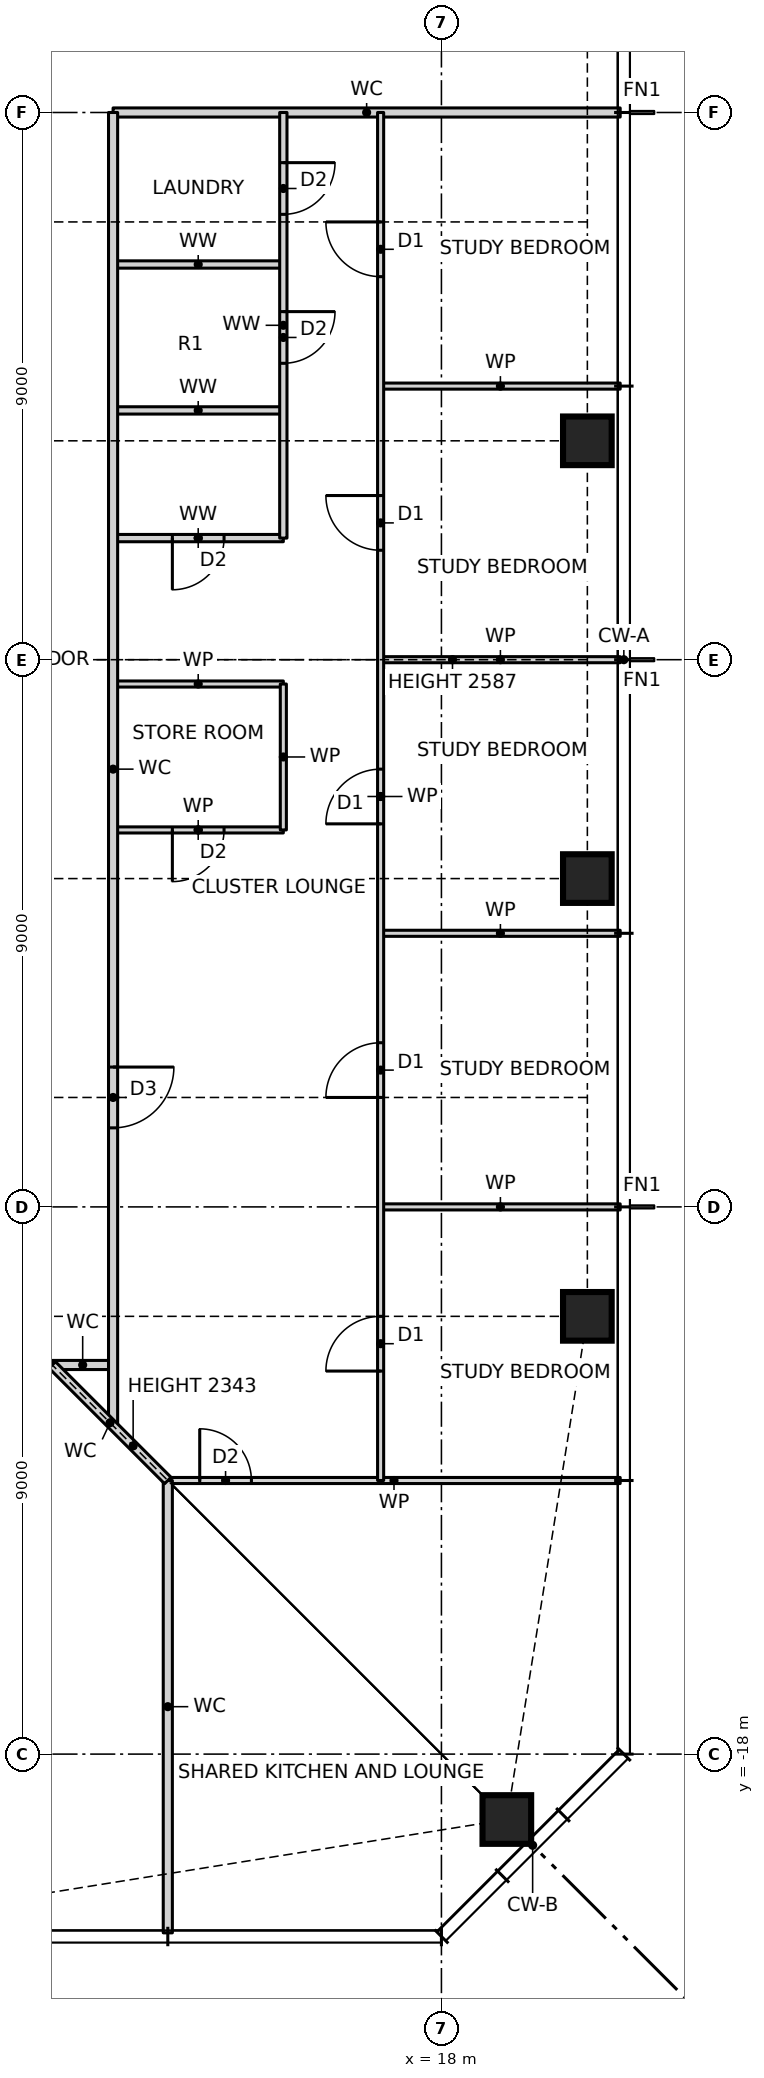
"""IFC4 building model, lengths in metres.
Left out: names, types, materials, properties, quantities, classifications, styles, units other than length and angle.
Written with IfcOpenShell. Run it as: python <this file> out.ifc"""

import sys

from ifc_helpers import new_model, si_unit, direction, frame, frame_2d, origin, origin_2d, place, context, subcontext, project, spatial, rectangle, hollow_rectangle, extrude, element, fill, save


model = new_model("IFC4")
c1 = context("Model", 3, precision=1e-05, world=origin(), true_north=direction((0.0, 1.0)))
c2 = subcontext(c1, "Body", "Model", "MODEL_VIEW")
j1 = project(units=[si_unit("LENGTHUNIT", "METRE"), si_unit("PLANEANGLEUNIT", "RADIAN")], contexts=[c1])
p1 = place(None, origin())
s1 = spatial("IfcSite", under=j1, at=p1, CompositionType="ELEMENT")
p2 = place(p1, origin())
s2 = spatial("IfcBuilding", under=s1, at=p2, CompositionType="ELEMENT")
p3 = place(p2, frame((0.0, 0.0, 101.5)))
s3 = spatial("IfcBuildingStorey", under=s2, at=p3, CompositionType="ELEMENT", Elevation=101.5)
for number, where, z_axis, x_axis in (
    (1, (19.076, -19.076, 0.0), (0.0, 0.0, 1.0), (1.0, 0.0, 0.0)),
    (2, (20.4, -10.8, 0.0), (0.0, 0.0, 1.0), (1.0, 0.0, 0.0)),
    (3, (20.4, -3.6, 0.0), (0.0, 0.0, 1.0), (1.0, 0.0, 0.0)),
    (4, (20.4, 3.6, 0.0), (0.0, 0.0, 1.0), (1.0, 0.0, 0.0)),
):
    element("IfcColumn", number, at=place(p3, frame(where, z_axis=z_axis, x_axis=x_axis)), inside=s3, PredefinedType="COLUMN", context=c2, shape_type="SweptSolid", body=[
        extrude(hollow_rectangle(XDim=0.8, YDim=0.8, WallThickness=0.07, at=origin_2d()), origin(), (0.0, 0.0, 1.0), 3.5),
    ])
p4 = place(p3, frame((13.5, -13.5, 0.0), z_axis=(0.0, 0.0, 1.0), x_axis=(1.0, 0.0, 0.0)))
e5 = element("IfcWall", 5, at=p4, inside=s3, PredefinedType="PARTITIONING", context=c2, shape_type="SweptSolid", body=[
    extrude(rectangle(XDim=7.44, YDim=0.1, at=frame_2d((3.72, 0.0))), origin(), (0.0, 0.0, 1.0), 3.27),
])
p5 = place(p4, frame((0.525, 0.0, 0.0)))
e6 = element("IfcOpeningElement", 6, at=p5, cuts=e5, PredefinedType="OPENING", context=c2, shape_type="SweptSolid", body=[
    extrude(rectangle(XDim=0.85, YDim=2.1, at=frame_2d((0.425, 1.05))), frame((0.0, 0.06, 0.0), z_axis=(0.0, -1.0, 0.0), x_axis=(1.0, 0.0, 0.0)), (0.0, 0.0, 1.0), 0.12),
])
p6 = place(p3, frame((11.6, -11.6, 0.0), z_axis=(0.0, 0.0, 1.0), x_axis=(1.0, 0.0, 0.0)))
e7 = element("IfcWall", 7, at=p6, inside=s3, PredefinedType="PARTITIONING", context=c2, shape_type="SweptSolid", body=[
    extrude(rectangle(XDim=1.0, YDim=0.15, at=frame_2d((0.5, 0.0))), origin(), (0.0, 0.0, 1.0), 3.27),
])
for number, where, z_axis, x_axis in (
    (8, (17.0, -9.0, 0.0), (0.0, 0.0, 1.0), (1.0, 0.0, 0.0)),
    (9, (17.0, -4.5, 0.0), (0.0, 0.0, 1.0), (1.0, 0.0, 0.0)),
):
    element("IfcWall", number, at=place(p3, frame(where, z_axis=z_axis, x_axis=x_axis)), inside=s3, PredefinedType="PARTITIONING", context=c2, shape_type="SweptSolid", body=[
        extrude(rectangle(XDim=3.94, YDim=0.1, at=frame_2d((1.97, 0.0))), origin(), (0.0, 0.0, 1.0), 3.27),
    ])
p7 = place(p3, frame((12.6, -2.8, 0.0), z_axis=(0.0, 0.0, 1.0), x_axis=(1.0, 0.0, 0.0)))
e10 = element("IfcWall", 10, at=p7, inside=s3, PredefinedType="PARTITIONING", context=c2, shape_type="SweptSolid", body=[
    extrude(rectangle(XDim=2.8, YDim=0.1, at=frame_2d((1.4, 0.0))), origin(), (0.0, 0.0, 1.0), 3.27),
])
p8 = place(p7, frame((0.975, 0.0, 0.0)))
e11 = element("IfcOpeningElement", 11, at=p8, cuts=e10, PredefinedType="OPENING", context=c2, shape_type="SweptSolid", body=[
    extrude(rectangle(XDim=0.85, YDim=2.1, at=frame_2d((0.425, 1.05))), frame((0.0, 0.06, 0.0), z_axis=(0.0, -1.0, 0.0), x_axis=(1.0, 0.0, 0.0)), (0.0, 0.0, 1.0), 0.12),
])
p9 = place(p3, frame((12.6, -0.4, 0.0), z_axis=(0.0, 0.0, 1.0), x_axis=(1.0, 0.0, 0.0)))
e12 = element("IfcWall", 12, at=p9, inside=s3, PredefinedType="PARTITIONING", context=c2, shape_type="SweptSolid", body=[
    extrude(rectangle(XDim=2.8, YDim=0.1, at=frame_2d((1.4, 0.0))), origin(), (0.0, 0.0, 1.0), 3.27),
])
p10 = place(p3, frame((17.0, 0.0, 0.0), z_axis=(0.0, 0.0, 1.0), x_axis=(1.0, 0.0, 0.0)))
e13 = element("IfcWall", 13, at=p10, inside=s3, PredefinedType="PARTITIONING", context=c2, shape_type="SweptSolid", body=[
    extrude(rectangle(XDim=3.94, YDim=0.1, at=frame_2d((1.97, 0.0))), origin(), (0.0, 0.0, 1.0), 2.587),
])
p11 = place(p3, frame((12.6, 2.0, 0.0), z_axis=(0.0, 0.0, 1.0), x_axis=(1.0, 0.0, 0.0)))
e14 = element("IfcWall", 14, at=p11, inside=s3, PredefinedType="PARTITIONING", context=c2, shape_type="SweptSolid", body=[
    extrude(rectangle(XDim=2.8, YDim=0.12, at=frame_2d((1.4, 0.0))), origin(), (0.0, 0.0, 1.0), 3.27),
])
p12 = place(p11, frame((0.975, 0.0, 0.0)))
e15 = element("IfcOpeningElement", 15, at=p12, cuts=e14, PredefinedType="OPENING", context=c2, shape_type="SweptSolid", body=[
    extrude(rectangle(XDim=0.85, YDim=2.1, at=frame_2d((0.425, 1.05))), frame((0.0, 0.07, 0.0), z_axis=(0.0, -1.0, 0.0), x_axis=(1.0, 0.0, 0.0)), (0.0, 0.0, 1.0), 0.14),
])
p13 = place(p3, frame((12.6, 4.1, 0.0), z_axis=(0.0, 0.0, 1.0), x_axis=(1.0, 0.0, 0.0)))
e16 = element("IfcWall", 16, at=p13, inside=s3, PredefinedType="PARTITIONING", context=c2, shape_type="SweptSolid", body=[
    extrude(rectangle(XDim=2.8, YDim=0.12, at=frame_2d((1.4, 0.0))), origin(), (0.0, 0.0, 1.0), 3.27),
])
p14 = place(p3, frame((17.0, 4.5, 0.0), z_axis=(0.0, 0.0, 1.0), x_axis=(1.0, 0.0, 0.0)))
e17 = element("IfcWall", 17, at=p14, inside=s3, PredefinedType="PARTITIONING", context=c2, shape_type="SweptSolid", body=[
    extrude(rectangle(XDim=3.94, YDim=0.1, at=frame_2d((1.97, 0.0))), origin(), (0.0, 0.0, 1.0), 3.27),
])
p15 = place(p3, frame((12.6, 6.5, 0.0), z_axis=(0.0, 0.0, 1.0), x_axis=(1.0, 0.0, 0.0)))
e18 = element("IfcWall", 18, at=p15, inside=s3, PredefinedType="PARTITIONING", context=c2, shape_type="SweptSolid", body=[
    extrude(rectangle(XDim=2.8, YDim=0.12, at=frame_2d((1.4, 0.0))), origin(), (0.0, 0.0, 1.0), 3.27),
])
p16 = place(p3, frame((12.6, 9.0, 0.0), z_axis=(0.0, 0.0, 1.0), x_axis=(1.0, 0.0, 0.0)))
e19 = element("IfcWall", 19, at=p16, inside=s3, PredefinedType="PARTITIONING", context=c2, shape_type="SweptSolid", body=[
    extrude(rectangle(XDim=8.34, YDim=0.15, at=frame_2d((4.17, 0.0))), origin(), (0.0, 0.0, 1.0), 3.27),
])
p17 = place(p3, frame((17.0, -13.5, 0.0), z_axis=(0.0, 0.0, 1.0), x_axis=(0.0, 1.0, 0.0)))
e20 = element("IfcWall", 20, at=p17, inside=s3, PredefinedType="PARTITIONING", context=c2, shape_type="SweptSolid", body=[
    extrude(rectangle(XDim=22.5, YDim=0.1, at=frame_2d((11.25, 0.0))), origin(), (0.0, 0.0, 1.0), 3.27),
])
p18 = place(p17, frame((1.8, 0.0, 0.0)))
e21 = element("IfcOpeningElement", 21, at=p18, cuts=e20, PredefinedType="OPENING", context=c2, shape_type="SweptSolid", body=[
    extrude(rectangle(XDim=0.9, YDim=2.1, at=frame_2d((0.45, 1.05))), frame((0.0, 0.06, 0.0), z_axis=(0.0, -1.0, 0.0), x_axis=(1.0, 0.0, 0.0)), (0.0, 0.0, 1.0), 0.12),
])
p19 = place(p17, frame((6.3, 0.0, 0.0)))
e22 = element("IfcOpeningElement", 22, at=p19, cuts=e20, PredefinedType="OPENING", context=c2, shape_type="SweptSolid", body=[
    extrude(rectangle(XDim=0.9, YDim=2.1, at=frame_2d((0.45, 1.05))), frame((0.0, 0.06, 0.0), z_axis=(0.0, -1.0, 0.0), x_axis=(1.0, 0.0, 0.0)), (0.0, 0.0, 1.0), 0.12),
])
p20 = place(p17, frame((10.8, 0.0, 0.0)))
e23 = element("IfcOpeningElement", 23, at=p20, cuts=e20, PredefinedType="OPENING", context=c2, shape_type="SweptSolid", body=[
    extrude(rectangle(XDim=0.9, YDim=2.1, at=frame_2d((0.45, 1.05))), frame((0.0, 0.06, 0.0), z_axis=(0.0, -1.0, 0.0), x_axis=(1.0, 0.0, 0.0)), (0.0, 0.0, 1.0), 0.12),
])
p21 = place(p17, frame((15.3, 0.0, 0.0)))
e24 = element("IfcOpeningElement", 24, at=p21, cuts=e20, PredefinedType="OPENING", context=c2, shape_type="SweptSolid", body=[
    extrude(rectangle(XDim=0.9, YDim=2.1, at=frame_2d((0.45, 1.05))), frame((0.0, 0.06, 0.0), z_axis=(0.0, -1.0, 0.0), x_axis=(1.0, 0.0, 0.0)), (0.0, 0.0, 1.0), 0.12),
])
p22 = place(p17, frame((19.8, 0.0, 0.0)))
e25 = element("IfcOpeningElement", 25, at=p22, cuts=e20, PredefinedType="OPENING", context=c2, shape_type="SweptSolid", body=[
    extrude(rectangle(XDim=0.9, YDim=2.1, at=frame_2d((0.45, 1.05))), frame((0.0, 0.06, 0.0), z_axis=(0.0, -1.0, 0.0), x_axis=(1.0, 0.0, 0.0)), (0.0, 0.0, 1.0), 0.12),
])
p23 = place(p3, frame((15.4, -2.8, 0.0), z_axis=(0.0, 0.0, 1.0), x_axis=(0.0, 1.0, 0.0)))
e26 = element("IfcWall", 26, at=p23, inside=s3, PredefinedType="PARTITIONING", context=c2, shape_type="SweptSolid", body=[
    extrude(rectangle(XDim=2.4, YDim=0.1, at=frame_2d((1.2, 0.0))), origin(), (0.0, 0.0, 1.0), 3.27),
])
p24 = place(p3, frame((15.4, 2.0, 0.0), z_axis=(0.0, 0.0, 1.0), x_axis=(0.0, 1.0, 0.0)))
e27 = element("IfcWall", 27, at=p24, inside=s3, PredefinedType="PARTITIONING", context=c2, shape_type="SweptSolid", body=[
    extrude(rectangle(XDim=7.0, YDim=0.12, at=frame_2d((3.5, 0.0))), origin(), (0.0, 0.0, 1.0), 3.27),
])
p25 = place(p24, frame((2.875, 0.0, 0.0)))
e28 = element("IfcOpeningElement", 28, at=p25, cuts=e27, PredefinedType="OPENING", context=c2, shape_type="SweptSolid", body=[
    extrude(rectangle(XDim=0.85, YDim=2.1, at=frame_2d((0.425, 1.05))), frame((0.0, 0.07, 0.0), z_axis=(0.0, -1.0, 0.0), x_axis=(1.0, 0.0, 0.0)), (0.0, 0.0, 1.0), 0.14),
])
p26 = place(p24, frame((5.325, 0.0, 0.0)))
e29 = element("IfcOpeningElement", 29, at=p26, cuts=e27, PredefinedType="OPENING", context=c2, shape_type="SweptSolid", body=[
    extrude(rectangle(XDim=0.85, YDim=2.1, at=frame_2d((0.425, 1.05))), frame((0.0, 0.07, 0.0), z_axis=(0.0, -1.0, 0.0), x_axis=(1.0, 0.0, 0.0)), (0.0, 0.0, 1.0), 0.14),
])
p27 = place(p3, frame((13.5, -20.94, 0.0), z_axis=(0.0, 0.0, 1.0), x_axis=(0.0, 1.0, 0.0)))
e30 = element("IfcWall", 30, at=p27, inside=s3, PredefinedType="PARTITIONING", context=c2, shape_type="SweptSolid", body=[
    extrude(rectangle(XDim=7.44, YDim=0.15, at=frame_2d((3.72, 0.0))), origin(), (0.0, 0.0, 1.0), 3.27),
])
p28 = place(p3, frame((12.6, -12.6, 0.0), z_axis=(0.0, 0.0, 1.0), x_axis=(0.0, 1.0, 0.0)))
e31 = element("IfcWall", 31, at=p28, inside=s3, PredefinedType="PARTITIONING", context=c2, shape_type="SweptSolid", body=[
    extrude(rectangle(XDim=21.6, YDim=0.15, at=frame_2d((10.8, 0.0))), origin(), (0.0, 0.0, 1.0), 3.27),
])
p29 = place(p28, frame((4.9, 0.0, 0.0)))
e32 = element("IfcOpeningElement", 32, at=p29, cuts=e31, PredefinedType="OPENING", context=c2, shape_type="SweptSolid", body=[
    extrude(rectangle(XDim=1.0, YDim=2.1, at=frame_2d((0.5, 1.05))), frame((0.0, 0.085, 0.0), z_axis=(0.0, -1.0, 0.0), x_axis=(1.0, 0.0, 0.0)), (0.0, 0.0, 1.0), 0.17),
])
p30 = place(p3, frame((13.5, -13.5, 0.0), z_axis=(0.0, 0.0, 1.0), x_axis=(-0.707106781187, 0.707106781187, 0.0)))
e33 = element("IfcWall", 33, at=p30, inside=s3, PredefinedType="PARTITIONING", context=c2, shape_type="SweptSolid", body=[
    extrude(rectangle(XDim=2.687, YDim=0.15, at=frame_2d((1.343, 0.0))), origin(), (0.0, 0.0, 1.0), 2.343),
])
p31 = place(p18, origin())
e34 = element("IfcDoor", 34, at=p31, inside=s3, OperationType="SINGLE_SWING_LEFT", PredefinedType="DOOR", context=c2, shape_type="SweptSolid", body=[
    extrude(rectangle(XDim=0.9, YDim=2.1, at=frame_2d((0.45, 1.05))), frame((0.0, 0.025, 0.0), z_axis=(0.0, -1.0, 0.0), x_axis=(1.0, 0.0, 0.0)), (0.0, 0.0, 1.0), 0.05),
])
fill(e21, e34)
p32 = place(p19, origin())
e35 = element("IfcDoor", 35, at=p32, inside=s3, OperationType="SINGLE_SWING_LEFT", PredefinedType="DOOR", context=c2, shape_type="SweptSolid", body=[
    extrude(rectangle(XDim=0.9, YDim=2.1, at=frame_2d((0.45, 1.05))), frame((0.0, 0.025, 0.0), z_axis=(0.0, -1.0, 0.0), x_axis=(1.0, 0.0, 0.0)), (0.0, 0.0, 1.0), 0.05),
])
fill(e22, e35)
p33 = place(p20, origin())
e36 = element("IfcDoor", 36, at=p33, inside=s3, OperationType="SINGLE_SWING_LEFT", PredefinedType="DOOR", context=c2, shape_type="SweptSolid", body=[
    extrude(rectangle(XDim=0.9, YDim=2.1, at=frame_2d((0.45, 1.05))), frame((0.0, 0.025, 0.0), z_axis=(0.0, -1.0, 0.0), x_axis=(1.0, 0.0, 0.0)), (0.0, 0.0, 1.0), 0.05),
])
fill(e23, e36)
p34 = place(p21, origin())
e37 = element("IfcDoor", 37, at=p34, inside=s3, OperationType="SINGLE_SWING_RIGHT", PredefinedType="DOOR", context=c2, shape_type="SweptSolid", body=[
    extrude(rectangle(XDim=0.9, YDim=2.1, at=frame_2d((0.45, 1.05))), frame((0.0, 0.025, 0.0), z_axis=(0.0, -1.0, 0.0), x_axis=(1.0, 0.0, 0.0)), (0.0, 0.0, 1.0), 0.05),
])
fill(e24, e37)
p35 = place(p22, origin())
e38 = element("IfcDoor", 38, at=p35, inside=s3, OperationType="SINGLE_SWING_RIGHT", PredefinedType="DOOR", context=c2, shape_type="SweptSolid", body=[
    extrude(rectangle(XDim=0.9, YDim=2.1, at=frame_2d((0.45, 1.05))), frame((0.0, 0.025, 0.0), z_axis=(0.0, -1.0, 0.0), x_axis=(1.0, 0.0, 0.0)), (0.0, 0.0, 1.0), 0.05),
])
fill(e25, e38)
p36 = place(p29, frame((1.0, 0.0, 0.0), z_axis=(0.0, 0.0, 1.0), x_axis=(-1.0, 0.0, 0.0)))
e39 = element("IfcDoor", 39, at=p36, inside=s3, OperationType="SINGLE_SWING_LEFT", PredefinedType="DOOR", context=c2, shape_type="SweptSolid", body=[
    extrude(rectangle(XDim=1.0, YDim=2.1, at=frame_2d((0.5, 1.05))), frame((0.0, 0.025, 0.0), z_axis=(0.0, -1.0, 0.0), x_axis=(1.0, 0.0, 0.0)), (0.0, 0.0, 1.0), 0.05),
])
fill(e32, e39)
p37 = place(p8, frame((0.85, 0.0, 0.0), z_axis=(0.0, 0.0, 1.0), x_axis=(-1.0, 0.0, 0.0)))
e40 = element("IfcDoor", 40, at=p37, inside=s3, OperationType="SINGLE_SWING_RIGHT", PredefinedType="DOOR", context=c2, shape_type="SweptSolid", body=[
    extrude(rectangle(XDim=0.85, YDim=2.1, at=frame_2d((0.425, 1.05))), frame((0.0, 0.025, 0.0), z_axis=(0.0, -1.0, 0.0), x_axis=(1.0, 0.0, 0.0)), (0.0, 0.0, 1.0), 0.05),
])
fill(e11, e40)
p38 = place(p12, frame((0.85, 0.0, 0.0), z_axis=(0.0, 0.0, 1.0), x_axis=(-1.0, 0.0, 0.0)))
e41 = element("IfcDoor", 41, at=p38, inside=s3, OperationType="SINGLE_SWING_RIGHT", PredefinedType="DOOR", context=c2, shape_type="SweptSolid", body=[
    extrude(rectangle(XDim=0.85, YDim=2.1, at=frame_2d((0.425, 1.05))), frame((0.0, 0.025, 0.0), z_axis=(0.0, -1.0, 0.0), x_axis=(1.0, 0.0, 0.0)), (0.0, 0.0, 1.0), 0.05),
])
fill(e15, e41)
p39 = place(p25, frame((0.85, 0.0, 0.0), z_axis=(0.0, 0.0, 1.0), x_axis=(-1.0, 0.0, 0.0)))
e42 = element("IfcDoor", 42, at=p39, inside=s3, OperationType="SINGLE_SWING_LEFT", PredefinedType="DOOR", context=c2, shape_type="SweptSolid", body=[
    extrude(rectangle(XDim=0.85, YDim=2.1, at=frame_2d((0.425, 1.05))), frame((0.0, 0.025, 0.0), z_axis=(0.0, -1.0, 0.0), x_axis=(1.0, 0.0, 0.0)), (0.0, 0.0, 1.0), 0.05),
])
fill(e28, e42)
p40 = place(p26, frame((0.85, 0.0, 0.0), z_axis=(0.0, 0.0, 1.0), x_axis=(-1.0, 0.0, 0.0)))
e43 = element("IfcDoor", 43, at=p40, inside=s3, OperationType="SINGLE_SWING_LEFT", PredefinedType="DOOR", context=c2, shape_type="SweptSolid", body=[
    extrude(rectangle(XDim=0.85, YDim=2.1, at=frame_2d((0.425, 1.05))), frame((0.0, 0.025, 0.0), z_axis=(0.0, -1.0, 0.0), x_axis=(1.0, 0.0, 0.0)), (0.0, 0.0, 1.0), 0.05),
])
fill(e29, e43)
p41 = place(p5, origin())
e44 = element("IfcDoor", 44, at=p41, inside=s3, OperationType="SINGLE_SWING_LEFT", PredefinedType="DOOR", context=c2, shape_type="SweptSolid", body=[
    extrude(rectangle(XDim=0.85, YDim=2.1, at=frame_2d((0.425, 1.05))), frame((0.0, 0.025, 0.0), z_axis=(0.0, -1.0, 0.0), x_axis=(1.0, 0.0, 0.0)), (0.0, 0.0, 1.0), 0.05),
])
fill(e6, e44)
save(model, sys.argv[1])
